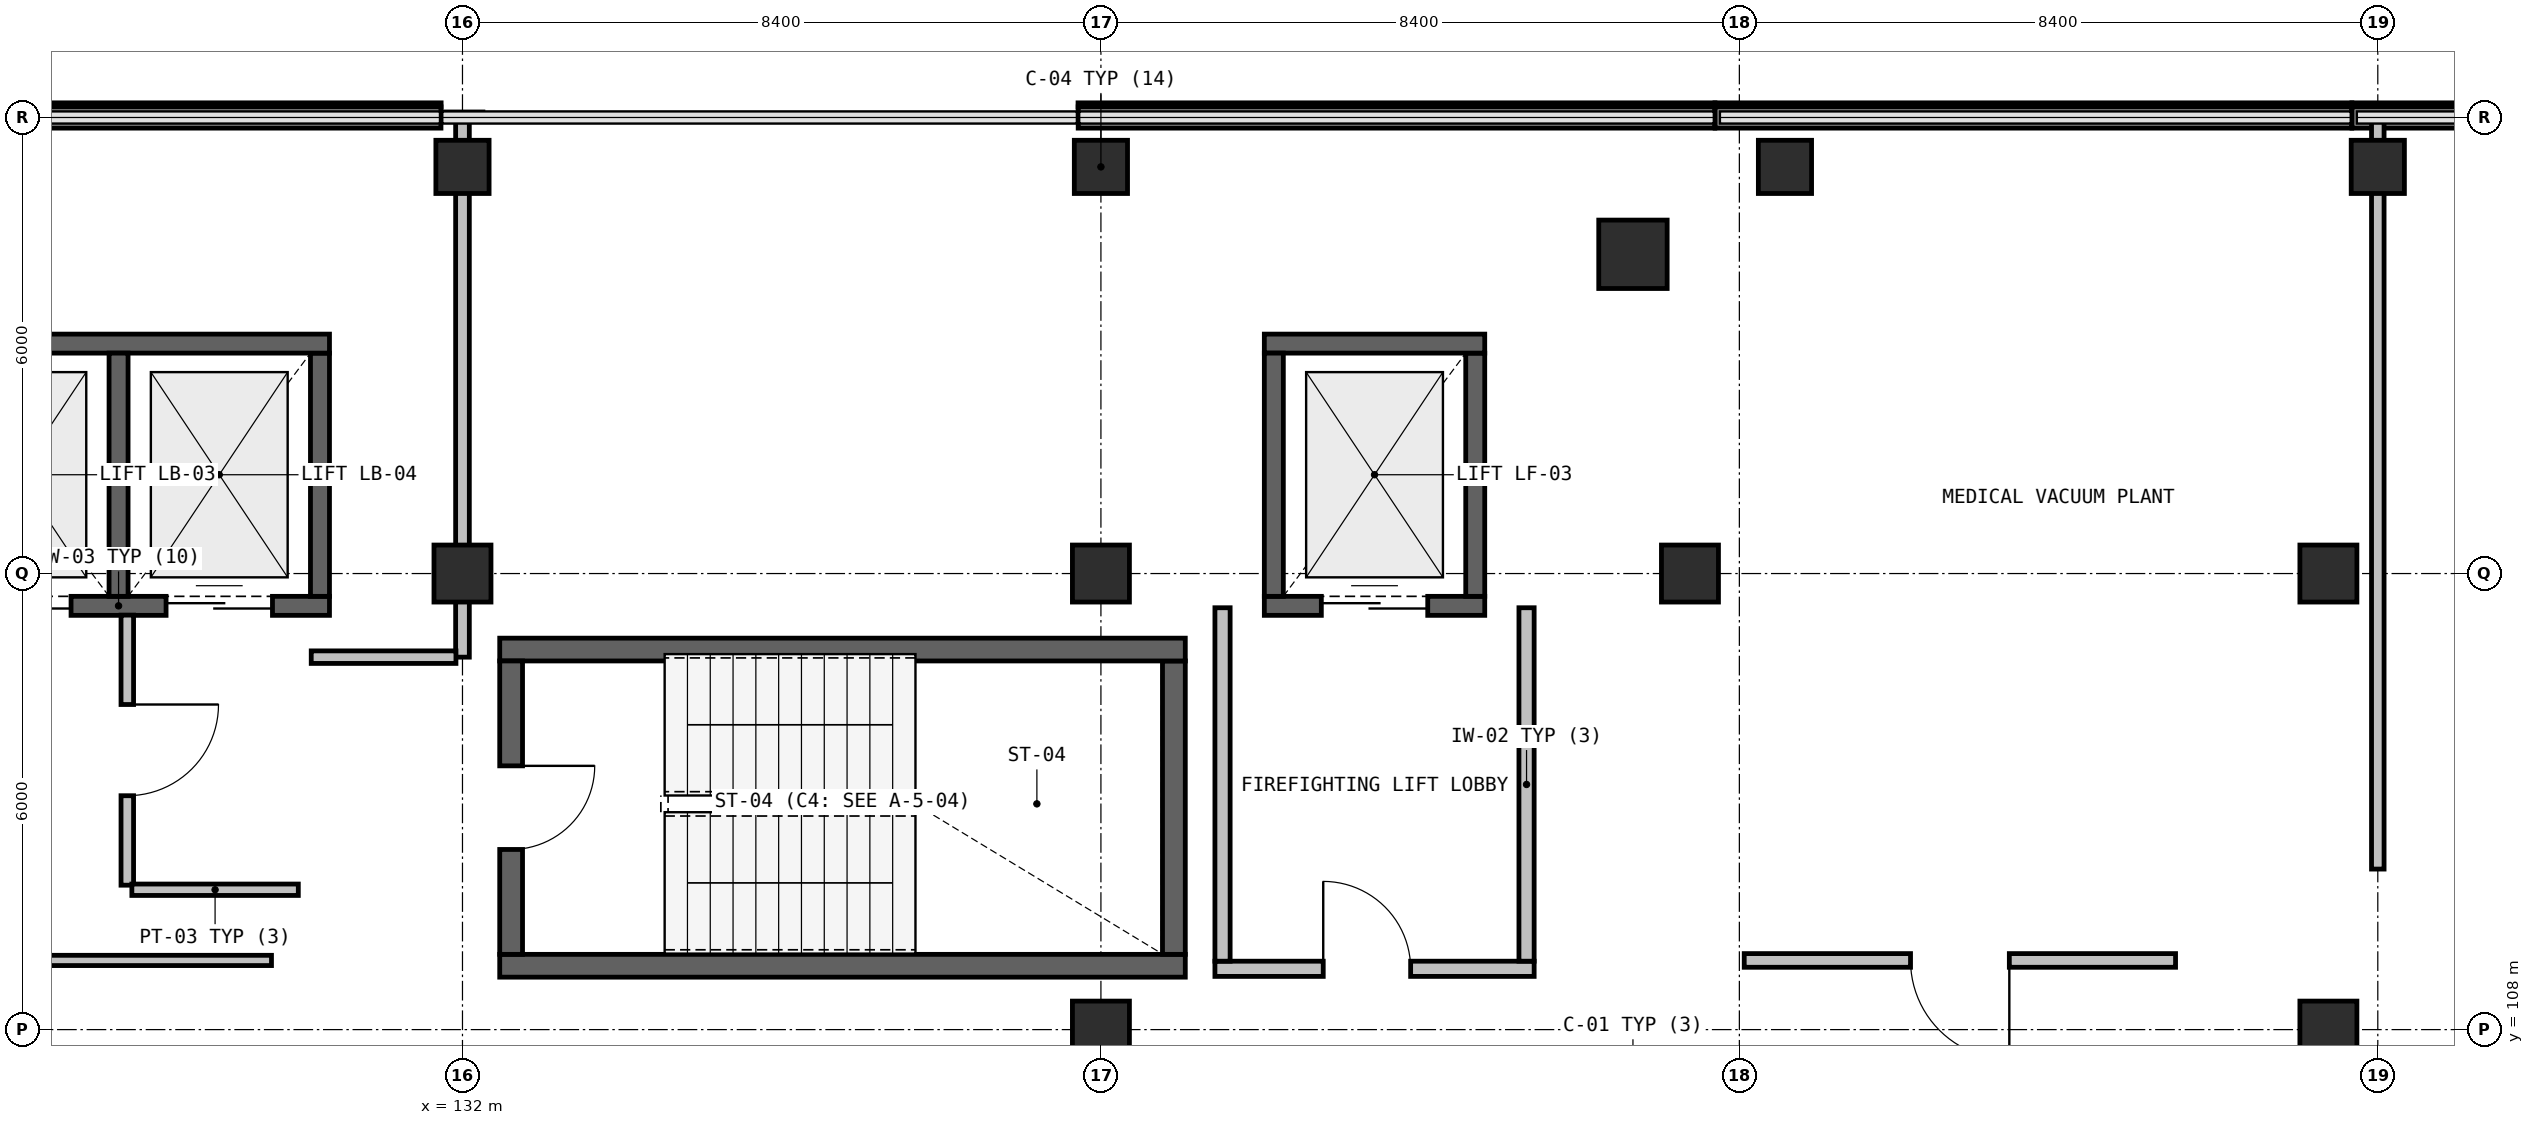
"""IFC4 building model, lengths in metres.
Left out: names, types, materials, properties, quantities, classifications, styles, units other than length and angle.
Written with IfcOpenShell. Run it as: python <this file> out.ifc"""

import sys

from ifc_helpers import new_model, si_unit, direction, frame, frame_2d, origin, origin_2d, place, context, subcontext, project, spatial, rectangle, extrude, element, fill, save


model = new_model("IFC4")
c1 = context("Model", 3, precision=1e-05, world=origin(), true_north=direction((0.0, 1.0)))
c2 = subcontext(c1, "Body", "Model", "MODEL_VIEW")
j1 = project(units=[si_unit("LENGTHUNIT", "METRE"), si_unit("PLANEANGLEUNIT", "RADIAN")], contexts=[c1])
p1 = place(None, origin())
s1 = spatial("IfcSite", under=j1, at=p1, CompositionType="ELEMENT")
p2 = place(p1, origin())
s2 = spatial("IfcBuilding", under=s1, at=p2, CompositionType="ELEMENT")
p3 = place(p2, frame((0.0, 0.0, 15.0)))
s3 = spatial("IfcBuildingStorey", under=s2, at=p3, CompositionType="ELEMENT", Elevation=15.0)
p4 = place(p3, frame((147.4, 118.2, 0.0), z_axis=(0.0, 0.0, 1.0), x_axis=(1.0, 0.0, 0.0)))
e1 = element("IfcColumn", 1, at=p4, inside=s3, PredefinedType="COLUMN", context=c2, shape_type="SweptSolid", body=[
    extrude(rectangle(XDim=0.9, YDim=0.9, at=origin_2d()), origin(), (0.0, 0.0, 1.0), 4.2),
])
for number, where, z_axis, x_axis in (
    (2, (149.4, 119.35, 0.0), (0.0, 0.0, 1.0), (1.0, 0.0, 0.0)),
    (3, (157.2, 119.35, 0.0), (0.0, 0.0, 1.0), (1.0, 0.0, 0.0)),
):
    element("IfcColumn", number, at=place(p3, frame(where, z_axis=z_axis, x_axis=x_axis)), inside=s3, PredefinedType="COLUMN", context=c2, shape_type="SweptSolid", body=[
        extrude(rectangle(XDim=0.7, YDim=0.7, at=origin_2d()), origin(), (0.0, 0.0, 1.0), 4.2),
    ])
p5 = place(p3, frame((132.0, 114.0, 0.0), z_axis=(0.0, 0.0, 1.0), x_axis=(1.0, 0.0, 0.0)))
e4 = element("IfcColumn", 4, at=p5, inside=s3, PredefinedType="COLUMN", context=c2, shape_type="SweptSolid", body=[
    extrude(rectangle(XDim=0.75, YDim=0.75, at=origin_2d()), origin(), (0.0, 0.0, 1.0), 4.2),
])
p6 = place(p3, frame((132.0, 119.35, 0.0), z_axis=(0.0, 0.0, 1.0), x_axis=(1.0, 0.0, 0.0)))
e5 = element("IfcColumn", 5, at=p6, inside=s3, PredefinedType="COLUMN", context=c2, shape_type="SweptSolid", body=[
    extrude(rectangle(XDim=0.7, YDim=0.7, at=origin_2d()), origin(), (0.0, 0.0, 1.0), 4.2),
])
for number, where, z_axis, x_axis in (
    (6, (140.4, 108.0, 0.0), (0.0, 0.0, 1.0), (1.0, 0.0, 0.0)),
    (7, (140.4, 114.0, 0.0), (0.0, 0.0, 1.0), (1.0, 0.0, 0.0)),
):
    element("IfcColumn", number, at=place(p3, frame(where, z_axis=z_axis, x_axis=x_axis)), inside=s3, PredefinedType="COLUMN", context=c2, shape_type="SweptSolid", body=[
        extrude(rectangle(XDim=0.75, YDim=0.75, at=origin_2d()), origin(), (0.0, 0.0, 1.0), 4.2),
    ])
p7 = place(p3, frame((140.4, 119.35, 0.0), z_axis=(0.0, 0.0, 1.0), x_axis=(1.0, 0.0, 0.0)))
e8 = element("IfcColumn", 8, at=p7, inside=s3, PredefinedType="COLUMN", context=c2, shape_type="SweptSolid", body=[
    extrude(rectangle(XDim=0.7, YDim=0.7, at=origin_2d()), origin(), (0.0, 0.0, 1.0), 4.2),
])
for number, where, z_axis, x_axis in (
    (9, (148.15, 114.0, 0.0), (0.0, 0.0, 1.0), (1.0, 0.0, 0.0)),
    (10, (156.55, 108.0, 0.0), (0.0, 0.0, 1.0), (1.0, 0.0, 0.0)),
    (11, (156.55, 114.0, 0.0), (0.0, 0.0, 1.0), (1.0, 0.0, 0.0)),
):
    element("IfcColumn", number, at=place(p3, frame(where, z_axis=z_axis, x_axis=x_axis)), inside=s3, PredefinedType="COLUMN", context=c2, shape_type="SweptSolid", body=[
        extrude(rectangle(XDim=0.75, YDim=0.75, at=origin_2d()), origin(), (0.0, 0.0, 1.0), 4.2),
    ])
for number, where, z_axis, x_axis in (
    (12, (123.341, 120.0, 0.0), (0.0, 0.0, 1.0), (1.0, 0.0, 0.0)),
    (13, (140.101, 120.0, 0.0), (0.0, 0.0, 1.0), (1.0, 0.0, 0.0)),
    (14, (148.481, 120.0, 0.0), (0.0, 0.0, 1.0), (1.0, 0.0, 0.0)),
    (15, (156.861, 120.0, 0.0), (0.0, 0.0, 1.0), (1.0, 0.0, 0.0)),
):
    element("IfcWall", number, at=place(p3, frame(where, z_axis=z_axis, x_axis=x_axis)), inside=s3, PredefinedType="SOLIDWALL", context=c2, shape_type="SweptSolid", body=[
        extrude(rectangle(XDim=8.376, YDim=0.28, at=frame_2d((4.188, 0.0))), origin(), (0.0, 0.0, 1.0), 0.94),
    ])
p8 = place(p3, frame((132.49, 108.84, 0.0), z_axis=(0.0, 0.0, 1.0), x_axis=(1.0, 0.0, 0.0)))
e16 = element("IfcWall", 16, at=p8, inside=s3, PredefinedType="SHEAR", context=c2, shape_type="SweptSolid", body=[
    extrude(rectangle(XDim=9.02, YDim=0.3, at=frame_2d((4.51, 0.0))), origin(), (0.0, 0.0, 1.0), 3.895),
])
p9 = place(p3, frame((141.36, 108.99, 0.0), z_axis=(0.0, 0.0, 1.0), x_axis=(0.0, 1.0, 0.0)))
e17 = element("IfcWall", 17, at=p9, inside=s3, PredefinedType="SHEAR", context=c2, shape_type="SweptSolid", body=[
    extrude(rectangle(XDim=3.86, YDim=0.3, at=frame_2d((1.93, 0.0))), origin(), (0.0, 0.0, 1.0), 3.895),
])
p10 = place(p3, frame((141.51, 113.0, 0.0), z_axis=(0.0, 0.0, 1.0), x_axis=(-1.0, 0.0, 0.0)))
e18 = element("IfcWall", 18, at=p10, inside=s3, PredefinedType="SHEAR", context=c2, shape_type="SweptSolid", body=[
    extrude(rectangle(XDim=9.02, YDim=0.3, at=frame_2d((4.51, 0.0))), origin(), (0.0, 0.0, 1.0), 3.895),
])
p11 = place(p3, frame((132.64, 112.85, 0.0), z_axis=(0.0, 0.0, 1.0), x_axis=(0.0, -1.0, 0.0)))
e19 = element("IfcWall", 19, at=p11, inside=s3, PredefinedType="SHEAR", context=c2, shape_type="SweptSolid", body=[
    extrude(rectangle(XDim=3.86, YDim=0.3, at=frame_2d((1.93, 0.0))), origin(), (0.0, 0.0, 1.0), 3.895),
])
p12 = place(p11, frame((1.38, 0.0, 0.0)))
e20 = element("IfcOpeningElement", 20, at=p12, cuts=e19, PredefinedType="OPENING", context=c2, shape_type="SweptSolid", body=[
    extrude(rectangle(XDim=1.1, YDim=2.15, at=frame_2d((0.55, 1.075))), frame((0.0, 0.16, 0.0), z_axis=(0.0, -1.0, 0.0), x_axis=(1.0, 0.0, 0.0)), (0.0, 0.0, 1.0), 0.32),
])
p13 = place(p3, frame((141.9, 108.8, 0.0), z_axis=(0.0, 0.0, 1.0), x_axis=(1.0, 0.0, 0.0)))
e21 = element("IfcWall", 21, at=p13, inside=s3, PredefinedType="SOLIDWALL", context=c2, shape_type="SweptSolid", body=[
    extrude(rectangle(XDim=4.2, YDim=0.2, at=frame_2d((2.1, 0.0))), origin(), (0.0, 0.0, 1.0), 3.895),
])
p14 = place(p13, frame((1.425, 0.0, 0.0)))
e22 = element("IfcOpeningElement", 22, at=p14, cuts=e21, PredefinedType="OPENING", context=c2, shape_type="SweptSolid", body=[
    extrude(rectangle(XDim=1.15, YDim=2.15, at=frame_2d((0.575, 1.075))), frame((0.0, 0.11, 0.0), z_axis=(0.0, -1.0, 0.0), x_axis=(1.0, 0.0, 0.0)), (0.0, 0.0, 1.0), 0.22),
])
for number, where, z_axis, x_axis in (
    (23, (146.0, 108.9, 0.0), (0.0, 0.0, 1.0), (0.0, 1.0, 0.0)),
    (24, (142.0, 113.55, 0.0), (0.0, 0.0, 1.0), (0.0, -1.0, 0.0)),
):
    element("IfcWall", number, at=place(p3, frame(where, z_axis=z_axis, x_axis=x_axis)), inside=s3, PredefinedType="SOLIDWALL", context=c2, shape_type="SweptSolid", body=[
        extrude(rectangle(XDim=4.65, YDim=0.2, at=frame_2d((2.325, 0.0))), origin(), (0.0, 0.0, 1.0), 3.895),
    ])
p15 = place(p3, frame((124.7, 113.575, 0.0), z_axis=(0.0, 0.0, 1.0), x_axis=(1.0, 0.0, 0.0)))
e25 = element("IfcWall", 25, at=p15, inside=s3, PredefinedType="SHEAR", context=c2, shape_type="SweptSolid", body=[
    extrude(rectangle(XDim=5.55, YDim=0.25, at=frame_2d((2.775, 0.0))), origin(), (0.0, 0.0, 1.0), 3.895),
])
p16 = place(p15, frame((0.75, 0.0, 0.0)))
e26 = element("IfcOpeningElement", 26, at=p16, cuts=e25, PredefinedType="OPENING", context=c2, shape_type="SweptSolid", body=[
    extrude(rectangle(XDim=1.4, YDim=2.2, at=frame_2d((0.7, 1.1))), frame((0.0, 0.135, 0.0), z_axis=(0.0, -1.0, 0.0), x_axis=(1.0, 0.0, 0.0)), (0.0, 0.0, 1.0), 0.27),
])
p17 = place(p15, frame((3.4, 0.0, 0.0)))
e27 = element("IfcOpeningElement", 27, at=p17, cuts=e25, PredefinedType="OPENING", context=c2, shape_type="SweptSolid", body=[
    extrude(rectangle(XDim=1.4, YDim=2.2, at=frame_2d((0.7, 1.1))), frame((0.0, 0.135, 0.0), z_axis=(0.0, -1.0, 0.0), x_axis=(1.0, 0.0, 0.0)), (0.0, 0.0, 1.0), 0.27),
])
p18 = place(p3, frame((130.125, 113.7, 0.0), z_axis=(0.0, 0.0, 1.0), x_axis=(0.0, 1.0, 0.0)))
e28 = element("IfcWall", 28, at=p18, inside=s3, PredefinedType="SHEAR", context=c2, shape_type="SweptSolid", body=[
    extrude(rectangle(XDim=3.2, YDim=0.25, at=frame_2d((1.6, 0.0))), origin(), (0.0, 0.0, 1.0), 3.895),
])
p19 = place(p3, frame((130.25, 117.025, 0.0), z_axis=(0.0, 0.0, 1.0), x_axis=(-1.0, 0.0, 0.0)))
e29 = element("IfcWall", 29, at=p19, inside=s3, PredefinedType="SHEAR", context=c2, shape_type="SweptSolid", body=[
    extrude(rectangle(XDim=5.55, YDim=0.25, at=frame_2d((2.775, 0.0))), origin(), (0.0, 0.0, 1.0), 3.895),
])
p20 = place(p3, frame((127.475, 113.7, 0.0), z_axis=(0.0, 0.0, 1.0), x_axis=(0.0, 1.0, 0.0)))
e30 = element("IfcWall", 30, at=p20, inside=s3, PredefinedType="SHEAR", context=c2, shape_type="SweptSolid", body=[
    extrude(rectangle(XDim=3.2, YDim=0.25, at=frame_2d((1.6, 0.0))), origin(), (0.0, 0.0, 1.0), 3.895),
])
p21 = place(p3, frame((142.55, 113.575, 0.0), z_axis=(0.0, 0.0, 1.0), x_axis=(1.0, 0.0, 0.0)))
e31 = element("IfcWall", 31, at=p21, inside=s3, PredefinedType="SHEAR", context=c2, shape_type="SweptSolid", body=[
    extrude(rectangle(XDim=2.9, YDim=0.25, at=frame_2d((1.45, 0.0))), origin(), (0.0, 0.0, 1.0), 3.895),
])
p22 = place(p21, frame((0.75, 0.0, 0.0)))
e32 = element("IfcOpeningElement", 32, at=p22, cuts=e31, PredefinedType="OPENING", context=c2, shape_type="SweptSolid", body=[
    extrude(rectangle(XDim=1.4, YDim=2.15, at=frame_2d((0.7, 1.075))), frame((0.0, 0.135, 0.0), z_axis=(0.0, -1.0, 0.0), x_axis=(1.0, 0.0, 0.0)), (0.0, 0.0, 1.0), 0.27),
])
p23 = place(p3, frame((145.325, 113.7, 0.0), z_axis=(0.0, 0.0, 1.0), x_axis=(0.0, 1.0, 0.0)))
e33 = element("IfcWall", 33, at=p23, inside=s3, PredefinedType="SHEAR", context=c2, shape_type="SweptSolid", body=[
    extrude(rectangle(XDim=3.2, YDim=0.25, at=frame_2d((1.6, 0.0))), origin(), (0.0, 0.0, 1.0), 3.895),
])
p24 = place(p3, frame((145.45, 117.025, 0.0), z_axis=(0.0, 0.0, 1.0), x_axis=(-1.0, 0.0, 0.0)))
e34 = element("IfcWall", 34, at=p24, inside=s3, PredefinedType="SHEAR", context=c2, shape_type="SweptSolid", body=[
    extrude(rectangle(XDim=2.9, YDim=0.25, at=frame_2d((1.45, 0.0))), origin(), (0.0, 0.0, 1.0), 3.895),
])
p25 = place(p3, frame((142.675, 116.9, 0.0), z_axis=(0.0, 0.0, 1.0), x_axis=(0.0, -1.0, 0.0)))
e35 = element("IfcWall", 35, at=p25, inside=s3, PredefinedType="SHEAR", context=c2, shape_type="SweptSolid", body=[
    extrude(rectangle(XDim=3.2, YDim=0.25, at=frame_2d((1.6, 0.0))), origin(), (0.0, 0.0, 1.0), 3.895),
])
p26 = place(p3, frame((127.59, 113.453, 0.0), z_axis=(0.0, 0.0, 1.0), x_axis=(0.0, -1.0, 0.0)))
e36 = element("IfcWall", 36, at=p26, inside=s3, PredefinedType="PARTITIONING", context=c2, shape_type="SweptSolid", body=[
    extrude(rectangle(XDim=3.553, YDim=0.165, at=frame_2d((1.776, 0.0))), origin(), (0.0, 0.0, 1.0), 3.895),
])
p27 = place(p26, frame((1.176, 0.0, 0.0)))
e37 = element("IfcOpeningElement", 37, at=p27, cuts=e36, PredefinedType="OPENING", context=c2, shape_type="SweptSolid", body=[
    extrude(rectangle(XDim=1.2, YDim=2.15, at=frame_2d((0.6, 1.075))), frame((0.0, 0.093, 0.0), z_axis=(0.0, -1.0, 0.0), x_axis=(1.0, 0.0, 0.0)), (0.0, 0.0, 1.0), 0.185),
])
p28 = place(p3, frame((127.65, 109.84, 0.0), z_axis=(0.0, 0.0, 1.0), x_axis=(1.0, 0.0, 0.0)))
e38 = element("IfcWall", 38, at=p28, inside=s3, PredefinedType="PARTITIONING", context=c2, shape_type="SweptSolid", body=[
    extrude(rectangle(XDim=2.19, YDim=0.15, at=frame_2d((1.095, 0.0))), origin(), (0.0, 0.0, 1.0), 3.895),
])
p29 = place(p3, frame((129.487, 108.91, 0.0), z_axis=(0.0, 0.0, 1.0), x_axis=(-1.0, 0.0, 0.0)))
e39 = element("IfcWall", 39, at=p29, inside=s3, PredefinedType="PARTITIONING", context=c2, shape_type="SweptSolid", body=[
    extrude(rectangle(XDim=3.876, YDim=0.135, at=frame_2d((1.938, 0.0))), origin(), (0.0, 0.0, 1.0), 3.895),
])
p30 = place(p3, frame((132.0, 119.989, 0.0), z_axis=(0.0, 0.0, 1.0), x_axis=(0.0, -1.0, 0.0)))
e40 = element("IfcWall", 40, at=p30, inside=s3, PredefinedType="PARTITIONING", context=c2, shape_type="SweptSolid", body=[
    extrude(rectangle(XDim=7.089, YDim=0.18, at=frame_2d((3.544, 0.0))), origin(), (0.0, 0.0, 1.0), 3.245),
])
p31 = place(p3, frame((131.914, 112.9, 0.0), z_axis=(0.0, 0.0, 1.0), x_axis=(-1.0, 0.0, 0.0)))
e41 = element("IfcWall", 41, at=p31, inside=s3, PredefinedType="PARTITIONING", context=c2, shape_type="SweptSolid", body=[
    extrude(rectangle(XDim=1.904, YDim=0.165, at=frame_2d((0.952, 0.0))), origin(), (0.0, 0.0, 1.0), 3.895),
])
p32 = place(p3, frame((154.539, 108.91, 0.0), z_axis=(0.0, 0.0, 1.0), x_axis=(-1.0, 0.0, 0.0)))
e42 = element("IfcWall", 42, at=p32, inside=s3, PredefinedType="PARTITIONING", context=c2, shape_type="SweptSolid", body=[
    extrude(rectangle(XDim=5.675, YDim=0.18, at=frame_2d((2.837, 0.0))), origin(), (0.0, 0.0, 1.0), 3.895),
])
p33 = place(p32, frame((2.187, 0.0, 0.0)))
e43 = element("IfcOpeningElement", 43, at=p33, cuts=e42, PredefinedType="OPENING", context=c2, shape_type="SweptSolid", body=[
    extrude(rectangle(XDim=1.3, YDim=2.15, at=frame_2d((0.65, 1.075))), frame((0.0, 0.1, 0.0), z_axis=(0.0, -1.0, 0.0), x_axis=(1.0, 0.0, 0.0)), (0.0, 0.0, 1.0), 0.2),
])
p34 = place(p3, frame((157.2, 119.958, 0.0), z_axis=(0.0, 0.0, 1.0), x_axis=(0.0, -1.0, 0.0)))
e44 = element("IfcWall", 44, at=p34, inside=s3, PredefinedType="PARTITIONING", context=c2, shape_type="SweptSolid", body=[
    extrude(rectangle(XDim=9.846, YDim=0.165, at=frame_2d((4.923, 0.0))), origin(), (0.0, 0.0, 1.0), 3.895),
])
p35 = place(p12, origin())
e45 = element("IfcDoor", 45, at=p35, inside=s3, OperationType="SINGLE_SWING_RIGHT", PredefinedType="DOOR", context=c2, shape_type="SweptSolid", body=[
    extrude(rectangle(XDim=1.1, YDim=2.15, at=frame_2d((0.55, 1.075))), frame((0.0, 0.025, 0.0), z_axis=(0.0, -1.0, 0.0), x_axis=(1.0, 0.0, 0.0)), (0.0, 0.0, 1.0), 0.05),
])
fill(e20, e45)
p36 = place(p14, origin())
e46 = element("IfcDoor", 46, at=p36, inside=s3, OperationType="SINGLE_SWING_LEFT", PredefinedType="DOOR", context=c2, shape_type="SweptSolid", body=[
    extrude(rectangle(XDim=1.15, YDim=2.15, at=frame_2d((0.575, 1.075))), frame((0.0, 0.025, 0.0), z_axis=(0.0, -1.0, 0.0), x_axis=(1.0, 0.0, 0.0)), (0.0, 0.0, 1.0), 0.05),
])
fill(e22, e46)
p37 = place(p16, origin())
e47 = element("IfcDoor", 47, at=p37, inside=s3, OperationType="DOUBLE_DOOR_SLIDING", PredefinedType="DOOR", context=c2, shape_type="SweptSolid", body=[
    extrude(rectangle(XDim=1.4, YDim=2.2, at=frame_2d((0.7, 1.1))), frame((0.0, 0.025, 0.0), z_axis=(0.0, -1.0, 0.0), x_axis=(1.0, 0.0, 0.0)), (0.0, 0.0, 1.0), 0.05),
])
fill(e26, e47)
p38 = place(p17, origin())
e48 = element("IfcDoor", 48, at=p38, inside=s3, OperationType="DOUBLE_DOOR_SLIDING", PredefinedType="DOOR", context=c2, shape_type="SweptSolid", body=[
    extrude(rectangle(XDim=1.4, YDim=2.2, at=frame_2d((0.7, 1.1))), frame((0.0, 0.025, 0.0), z_axis=(0.0, -1.0, 0.0), x_axis=(1.0, 0.0, 0.0)), (0.0, 0.0, 1.0), 0.05),
])
fill(e27, e48)
p39 = place(p22, origin())
e49 = element("IfcDoor", 49, at=p39, inside=s3, OperationType="DOUBLE_DOOR_SLIDING", PredefinedType="DOOR", context=c2, shape_type="SweptSolid", body=[
    extrude(rectangle(XDim=1.4, YDim=2.15, at=frame_2d((0.7, 1.075))), frame((0.0, 0.025, 0.0), z_axis=(0.0, -1.0, 0.0), x_axis=(1.0, 0.0, 0.0)), (0.0, 0.0, 1.0), 0.05),
])
fill(e32, e49)
p40 = place(p27, origin())
e50 = element("IfcDoor", 50, at=p40, inside=s3, OperationType="SINGLE_SWING_LEFT", PredefinedType="DOOR", context=c2, shape_type="SweptSolid", body=[
    extrude(rectangle(XDim=1.2, YDim=2.15, at=frame_2d((0.6, 1.075))), frame((0.0, 0.025, 0.0), z_axis=(0.0, -1.0, 0.0), x_axis=(1.0, 0.0, 0.0)), (0.0, 0.0, 1.0), 0.05),
])
fill(e37, e50)
p41 = place(p33, origin())
e51 = element("IfcDoor", 51, at=p41, inside=s3, OperationType="SINGLE_SWING_RIGHT", PredefinedType="DOOR", context=c2, shape_type="SweptSolid", body=[
    extrude(rectangle(XDim=1.3, YDim=2.15, at=frame_2d((0.65, 1.075))), frame((0.0, 0.025, 0.0), z_axis=(0.0, -1.0, 0.0), x_axis=(1.0, 0.0, 0.0)), (0.0, 0.0, 1.0), 0.05),
])
fill(e43, e51)
save(model, sys.argv[1])
